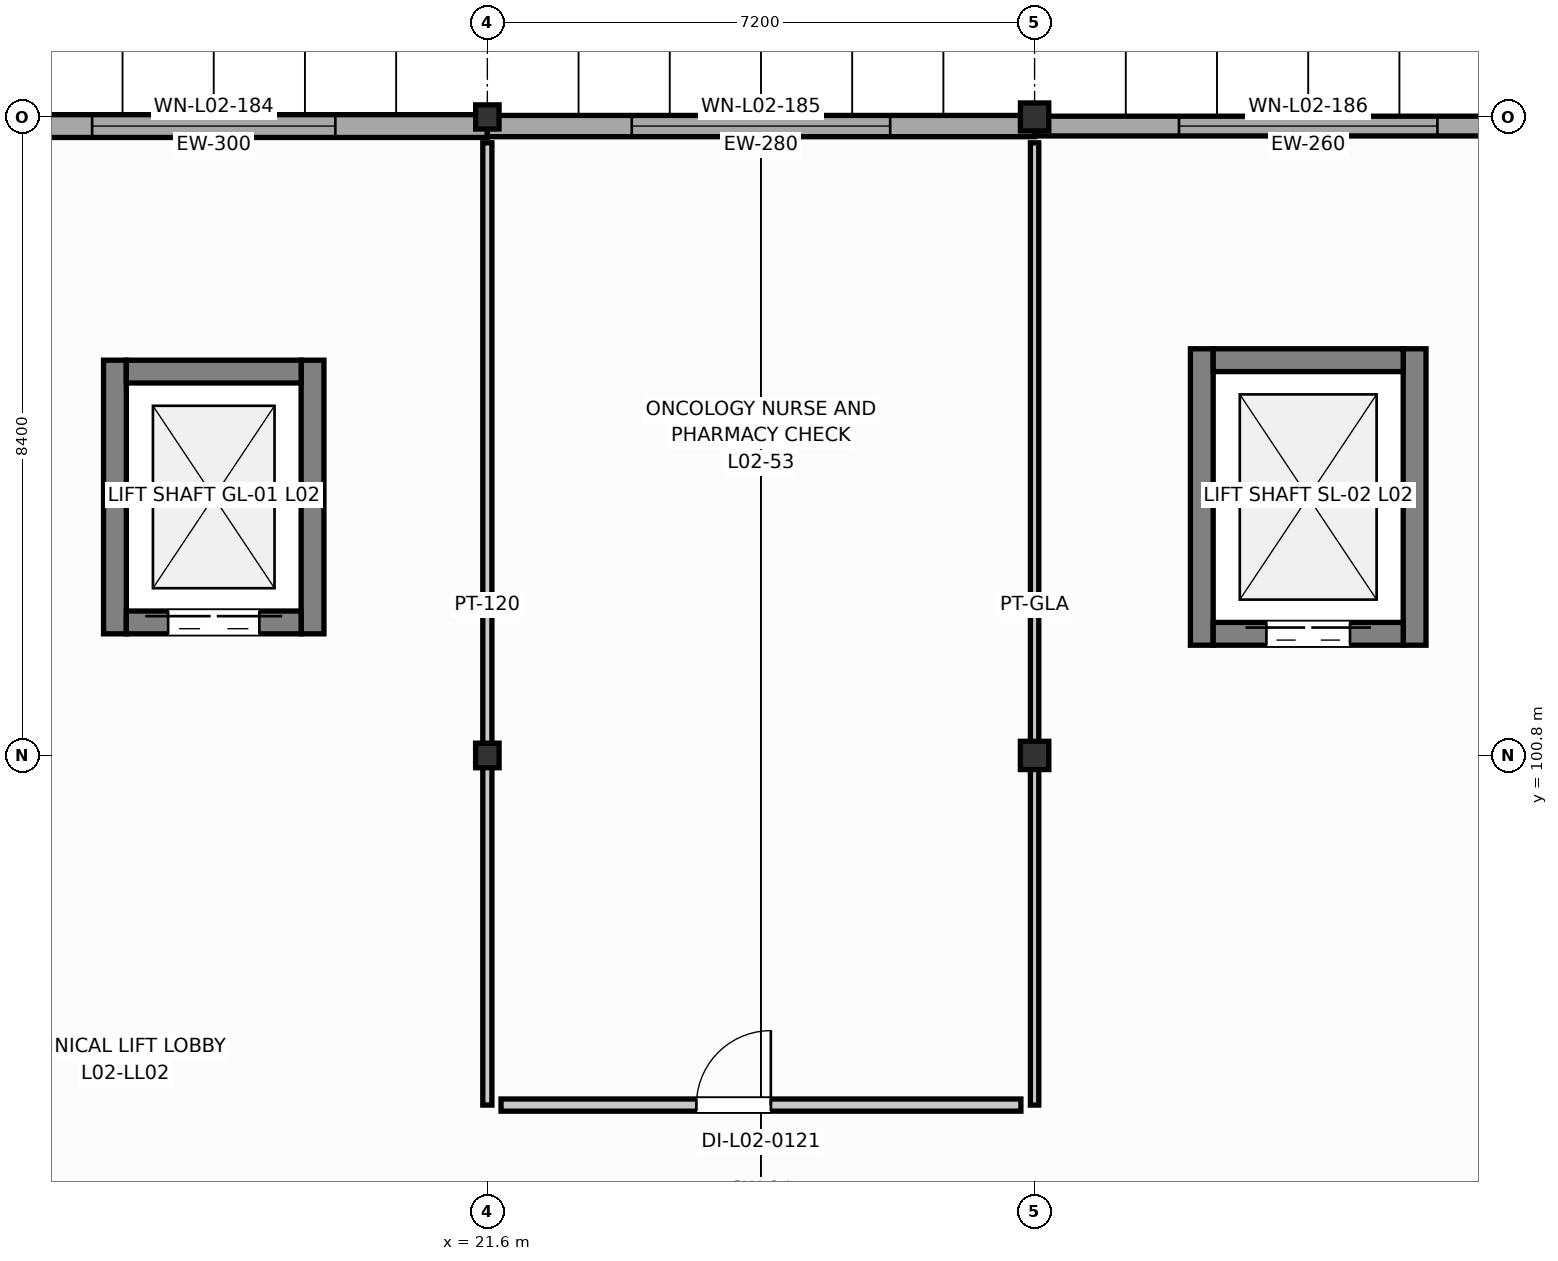
"""IFC4 building model, lengths in metres.
Left out: names, types, materials, properties, quantities, classifications, styles, units other than length and angle.
Written with IfcOpenShell. Run it as: python <this file> out.ifc"""

import sys

from ifc_helpers import new_model, si_unit, direction, frame, frame_2d, origin, origin_2d, place, context, subcontext, project, spatial, rectangle, i_section, extrude, element, fill, save


model = new_model("IFC4")
c1 = context("Model", 3, precision=1e-05, world=origin(), true_north=direction((0.0, 1.0)))
c2 = subcontext(c1, "Body", "Model", "MODEL_VIEW")
j1 = project(units=[si_unit("LENGTHUNIT", "METRE"), si_unit("PLANEANGLEUNIT", "RADIAN")], contexts=[c1])
p1 = place(None, origin())
s1 = spatial("IfcSite", under=j1, at=p1, CompositionType="ELEMENT")
p2 = place(p1, origin())
s2 = spatial("IfcBuilding", under=s1, at=p2, CompositionType="ELEMENT")
p3 = place(p2, frame((0.0, 0.0, 9.0)))
s3 = spatial("IfcBuildingStorey", under=s2, at=p3, CompositionType="ELEMENT", Elevation=9.0)
p4 = place(p3, frame((21.6, 100.8, 0.0), z_axis=(0.0, 0.0, 1.0), x_axis=(1.0, 0.0, 0.0)))
e1 = element("IfcColumn", 1, at=p4, inside=s3, PredefinedType="COLUMN", context=c2, shape_type="SweptSolid", body=[
    extrude(i_section(OverallWidth=0.309, OverallDepth=0.323, WebThickness=0.014, FlangeThickness=0.023, FilletRadius=0.016, at=origin_2d()), origin(), (0.0, 0.0, 1.0), 4.2),
])
p5 = place(p3, frame((21.6, 109.2, 0.0), z_axis=(0.0, 0.0, 1.0), x_axis=(1.0, 0.0, 0.0)))
e2 = element("IfcColumn", 2, at=p5, inside=s3, PredefinedType="COLUMN", context=c2, shape_type="SweptSolid", body=[
    extrude(i_section(OverallWidth=0.308, OverallDepth=0.318, WebThickness=0.013, FlangeThickness=0.021, FilletRadius=0.016, at=origin_2d()), origin(), (0.0, 0.0, 1.0), 4.2),
])
p6 = place(p3, frame((28.8, 100.8, 0.0), z_axis=(0.0, 0.0, 1.0), x_axis=(1.0, 0.0, 0.0)))
e3 = element("IfcColumn", 3, at=p6, inside=s3, PredefinedType="COLUMN", context=c2, shape_type="SweptSolid", body=[
    extrude(i_section(OverallWidth=0.374, OverallDepth=0.372, WebThickness=0.016, FlangeThickness=0.026, FilletRadius=0.02, at=origin_2d()), origin(), (0.0, 0.0, 1.0), 4.2),
])
p7 = place(p3, frame((28.8, 109.2, 0.0), z_axis=(0.0, 0.0, 1.0), x_axis=(1.0, 0.0, 0.0)))
e4 = element("IfcColumn", 4, at=p7, inside=s3, PredefinedType="COLUMN", context=c2, shape_type="SweptSolid", body=[
    extrude(i_section(OverallWidth=0.373, OverallDepth=0.368, WebThickness=0.015, FlangeThickness=0.024, FilletRadius=0.02, at=origin_2d()), origin(), (0.0, 0.0, 1.0), 4.2),
])
for number, where, z_axis, x_axis in (
    (5, (31.0, 102.25, 0.0), (0.0, 0.0, 1.0), (0.0, 1.0, 0.0)),
    (6, (33.8, 102.25, 0.0), (0.0, 0.0, 1.0), (0.0, 1.0, 0.0)),
):
    element("IfcWall", number, at=place(p3, frame(where, z_axis=z_axis, x_axis=x_axis)), inside=s3, PredefinedType="SHEAR", context=c2, shape_type="SweptSolid", body=[
        extrude(rectangle(XDim=3.9, YDim=0.3, at=frame_2d((1.95, 0.0))), origin(), (0.0, 0.0, 1.0), 3.99),
    ])
p8 = place(p3, frame((31.15, 106.0, 0.0), z_axis=(0.0, 0.0, 1.0), x_axis=(1.0, 0.0, 0.0)))
e7 = element("IfcWall", 7, at=p8, inside=s3, PredefinedType="SHEAR", context=c2, shape_type="SweptSolid", body=[
    extrude(rectangle(XDim=2.5, YDim=0.3, at=frame_2d((1.25, 0.0))), origin(), (0.0, 0.0, 1.0), 3.99),
])
p9 = place(p3, frame((31.15, 102.4, 0.0), z_axis=(0.0, 0.0, 1.0), x_axis=(1.0, 0.0, 0.0)))
e8 = element("IfcWall", 8, at=p9, inside=s3, PredefinedType="SHEAR", context=c2, shape_type="SweptSolid", body=[
    extrude(rectangle(XDim=2.5, YDim=0.3, at=frame_2d((1.25, 0.0))), origin(), (0.0, 0.0, 1.0), 3.99),
])
p10 = place(p9, frame((0.7, 0.0, 0.0)))
e9 = element("IfcOpeningElement", 9, at=p10, cuts=e8, PredefinedType="OPENING", context=c2, shape_type="SweptSolid", body=[
    extrude(rectangle(XDim=1.1, YDim=2.15, at=frame_2d((0.55, 1.075))), frame((0.0, 0.16, 0.0), z_axis=(0.0, -1.0, 0.0), x_axis=(1.0, 0.0, 0.0)), (0.0, 0.0, 1.0), 0.32),
])
for number, where, z_axis, x_axis in (
    (10, (16.7, 102.4, 0.0), (0.0, 0.0, 1.0), (0.0, 1.0, 0.0)),
    (11, (19.3, 102.4, 0.0), (0.0, 0.0, 1.0), (0.0, 1.0, 0.0)),
):
    element("IfcWall", number, at=place(p3, frame(where, z_axis=z_axis, x_axis=x_axis)), inside=s3, PredefinedType="SHEAR", context=c2, shape_type="SweptSolid", body=[
        extrude(rectangle(XDim=3.6, YDim=0.3, at=frame_2d((1.8, 0.0))), origin(), (0.0, 0.0, 1.0), 3.99),
    ])
p11 = place(p3, frame((16.85, 105.85, 0.0), z_axis=(0.0, 0.0, 1.0), x_axis=(1.0, 0.0, 0.0)))
e12 = element("IfcWall", 12, at=p11, inside=s3, PredefinedType="SHEAR", context=c2, shape_type="SweptSolid", body=[
    extrude(rectangle(XDim=2.3, YDim=0.3, at=frame_2d((1.15, 0.0))), origin(), (0.0, 0.0, 1.0), 3.99),
])
p12 = place(p3, frame((16.85, 102.55, 0.0), z_axis=(0.0, 0.0, 1.0), x_axis=(1.0, 0.0, 0.0)))
e13 = element("IfcWall", 13, at=p12, inside=s3, PredefinedType="SHEAR", context=c2, shape_type="SweptSolid", body=[
    extrude(rectangle(XDim=2.3, YDim=0.3, at=frame_2d((1.15, 0.0))), origin(), (0.0, 0.0, 1.0), 3.99),
])
p13 = place(p12, frame((0.55, 0.0, 0.0)))
e14 = element("IfcOpeningElement", 14, at=p13, cuts=e13, PredefinedType="OPENING", context=c2, shape_type="SweptSolid", body=[
    extrude(rectangle(XDim=1.2, YDim=2.15, at=frame_2d((0.6, 1.075))), frame((0.0, 0.16, 0.0), z_axis=(0.0, -1.0, 0.0), x_axis=(1.0, 0.0, 0.0)), (0.0, 0.0, 1.0), 0.32),
])
p14 = place(p3, frame((14.4, 109.08, 0.0), z_axis=(0.0, 0.0, 1.0), x_axis=(1.0, 0.0, 0.0)))
e15 = element("IfcWall", 15, at=p14, inside=s3, PredefinedType="SOLIDWALL", context=c2, shape_type="SweptSolid", body=[
    extrude(rectangle(XDim=7.2, YDim=0.3, at=frame_2d((3.6, 0.0))), origin(), (0.0, 0.0, 1.0), 3.482),
])
p15 = place(p14, frame((2.0, 0.0, 0.95)))
e16 = element("IfcOpeningElement", 16, at=p15, cuts=e15, PredefinedType="OPENING", context=c2, shape_type="SweptSolid", body=[
    extrude(rectangle(XDim=3.2, YDim=1.75, at=frame_2d((1.6, 0.875))), frame((0.0, 0.16, 0.0), z_axis=(0.0, -1.0, 0.0), x_axis=(1.0, 0.0, 0.0)), (0.0, 0.0, 1.0), 0.32),
])
p16 = place(p3, frame((21.6, 109.08, 0.0), z_axis=(0.0, 0.0, 1.0), x_axis=(1.0, 0.0, 0.0)))
e17 = element("IfcWall", 17, at=p16, inside=s3, PredefinedType="SOLIDWALL", context=c2, shape_type="SweptSolid", body=[
    extrude(rectangle(XDim=7.2, YDim=0.28, at=frame_2d((3.6, 0.0))), origin(), (0.0, 0.0, 1.0), 3.482),
])
p17 = place(p16, frame((1.9, 0.0, 0.95)))
e18 = element("IfcOpeningElement", 18, at=p17, cuts=e17, PredefinedType="OPENING", context=c2, shape_type="SweptSolid", body=[
    extrude(rectangle(XDim=3.4, YDim=1.15, at=frame_2d((1.7, 0.575))), frame((0.0, 0.15, 0.0), z_axis=(0.0, -1.0, 0.0), x_axis=(1.0, 0.0, 0.0)), (0.0, 0.0, 1.0), 0.3),
])
p18 = place(p3, frame((28.8, 109.08, 0.0), z_axis=(0.0, 0.0, 1.0), x_axis=(1.0, 0.0, 0.0)))
e19 = element("IfcWall", 19, at=p18, inside=s3, PredefinedType="SOLIDWALL", context=c2, shape_type="SweptSolid", body=[
    extrude(rectangle(XDim=7.2, YDim=0.26, at=frame_2d((3.6, 0.0))), origin(), (0.0, 0.0, 1.0), 3.482),
])
p19 = place(p18, frame((1.9, 0.0, 0.95)))
e20 = element("IfcOpeningElement", 20, at=p19, cuts=e19, PredefinedType="OPENING", context=c2, shape_type="SweptSolid", body=[
    extrude(rectangle(XDim=3.4, YDim=1.35, at=frame_2d((1.7, 0.675))), frame((0.0, 0.14, 0.0), z_axis=(0.0, -1.0, 0.0), x_axis=(1.0, 0.0, 0.0)), (0.0, 0.0, 1.0), 0.28),
])
p20 = place(p3, frame((21.6, 96.2, 0.0), z_axis=(0.0, 0.0, 1.0), x_axis=(0.0, 1.0, 0.0)))
e21 = element("IfcWall", 21, at=p20, inside=s3, PredefinedType="PARTITIONING", context=c2, shape_type="SweptSolid", body=[
    extrude(rectangle(XDim=12.66, YDim=0.12, at=frame_2d((6.33, 0.0))), origin(), (0.0, 0.0, 1.0), 3.408),
])
p21 = place(p3, frame((28.8, 108.86, 0.0), z_axis=(0.0, 0.0, 1.0), x_axis=(0.0, -1.0, 0.0)))
e22 = element("IfcWall", 22, at=p21, inside=s3, PredefinedType="MOVABLE", context=c2, shape_type="SweptSolid", body=[
    extrude(rectangle(XDim=12.66, YDim=0.11, at=frame_2d((6.33, 0.0))), origin(), (0.0, 0.0, 1.0), 3.479),
])
p22 = place(p3, frame((28.62, 96.2, 0.0), z_axis=(0.0, 0.0, 1.0), x_axis=(-1.0, 0.0, 0.0)))
e23 = element("IfcWall", 23, at=p22, inside=s3, PredefinedType="PARTITIONING", context=c2, shape_type="SweptSolid", body=[
    extrude(rectangle(XDim=6.84, YDim=0.16, at=frame_2d((3.42, 0.0))), origin(), (0.0, 0.0, 1.0), 3.945),
])
p23 = place(p22, frame((3.29, 0.0, 0.0)))
e24 = element("IfcOpeningElement", 24, at=p23, cuts=e23, PredefinedType="OPENING", context=c2, shape_type="SweptSolid", body=[
    extrude(rectangle(XDim=0.98, YDim=2.05, at=frame_2d((0.49, 1.025))), frame((0.0, 0.09, 0.0), z_axis=(0.0, -1.0, 0.0), x_axis=(1.0, 0.0, 0.0)), (0.0, 0.0, 1.0), 0.18),
])
p24 = place(p10, origin())
e25 = element("IfcDoor", 25, at=p24, inside=s3, OperationType="DOUBLE_DOOR_SLIDING", PredefinedType="DOOR", context=c2, shape_type="SweptSolid", body=[
    extrude(rectangle(XDim=1.1, YDim=2.15, at=frame_2d((0.55, 1.075))), frame((0.0, 0.025, 0.0), z_axis=(0.0, -1.0, 0.0), x_axis=(1.0, 0.0, 0.0)), (0.0, 0.0, 1.0), 0.05),
])
fill(e9, e25)
p25 = place(p13, origin())
e26 = element("IfcDoor", 26, at=p25, inside=s3, OperationType="DOUBLE_DOOR_SLIDING", PredefinedType="DOOR", context=c2, shape_type="SweptSolid", body=[
    extrude(rectangle(XDim=1.2, YDim=2.15, at=frame_2d((0.6, 1.075))), frame((0.0, 0.025, 0.0), z_axis=(0.0, -1.0, 0.0), x_axis=(1.0, 0.0, 0.0)), (0.0, 0.0, 1.0), 0.05),
])
fill(e14, e26)
p26 = place(p15, origin())
e27 = element("IfcWindow", 27, at=p26, inside=s3, PartitioningType="SINGLE_PANEL", PredefinedType="WINDOW", context=c2, shape_type="SweptSolid", body=[
    extrude(rectangle(XDim=3.2, YDim=1.75, at=frame_2d((1.6, 0.875))), frame((0.0, 0.03, 0.0), z_axis=(0.0, -1.0, 0.0), x_axis=(1.0, 0.0, 0.0)), (0.0, 0.0, 1.0), 0.06),
])
fill(e16, e27)
p27 = place(p17, origin())
e28 = element("IfcWindow", 28, at=p27, inside=s3, PartitioningType="SINGLE_PANEL", PredefinedType="WINDOW", context=c2, shape_type="SweptSolid", body=[
    extrude(rectangle(XDim=3.4, YDim=1.15, at=frame_2d((1.7, 0.575))), frame((0.0, 0.03, 0.0), z_axis=(0.0, -1.0, 0.0), x_axis=(1.0, 0.0, 0.0)), (0.0, 0.0, 1.0), 0.06),
])
fill(e18, e28)
p28 = place(p19, origin())
e29 = element("IfcWindow", 29, at=p28, inside=s3, PartitioningType="SINGLE_PANEL", PredefinedType="WINDOW", context=c2, shape_type="SweptSolid", body=[
    extrude(rectangle(XDim=3.4, YDim=1.35, at=frame_2d((1.7, 0.675))), frame((0.0, 0.03, 0.0), z_axis=(0.0, -1.0, 0.0), x_axis=(1.0, 0.0, 0.0)), (0.0, 0.0, 1.0), 0.06),
])
fill(e20, e29)
p29 = place(p23, frame((0.98, 0.0, 0.0), z_axis=(0.0, 0.0, 1.0), x_axis=(-1.0, 0.0, 0.0)))
e30 = element("IfcDoor", 30, at=p29, inside=s3, OperationType="SINGLE_SWING_RIGHT", PredefinedType="DOOR", context=c2, shape_type="SweptSolid", body=[
    extrude(rectangle(XDim=0.98, YDim=2.05, at=frame_2d((0.49, 1.025))), frame((0.0, 0.025, 0.0), z_axis=(0.0, -1.0, 0.0), x_axis=(1.0, 0.0, 0.0)), (0.0, 0.0, 1.0), 0.05),
])
fill(e24, e30)
save(model, sys.argv[1])
